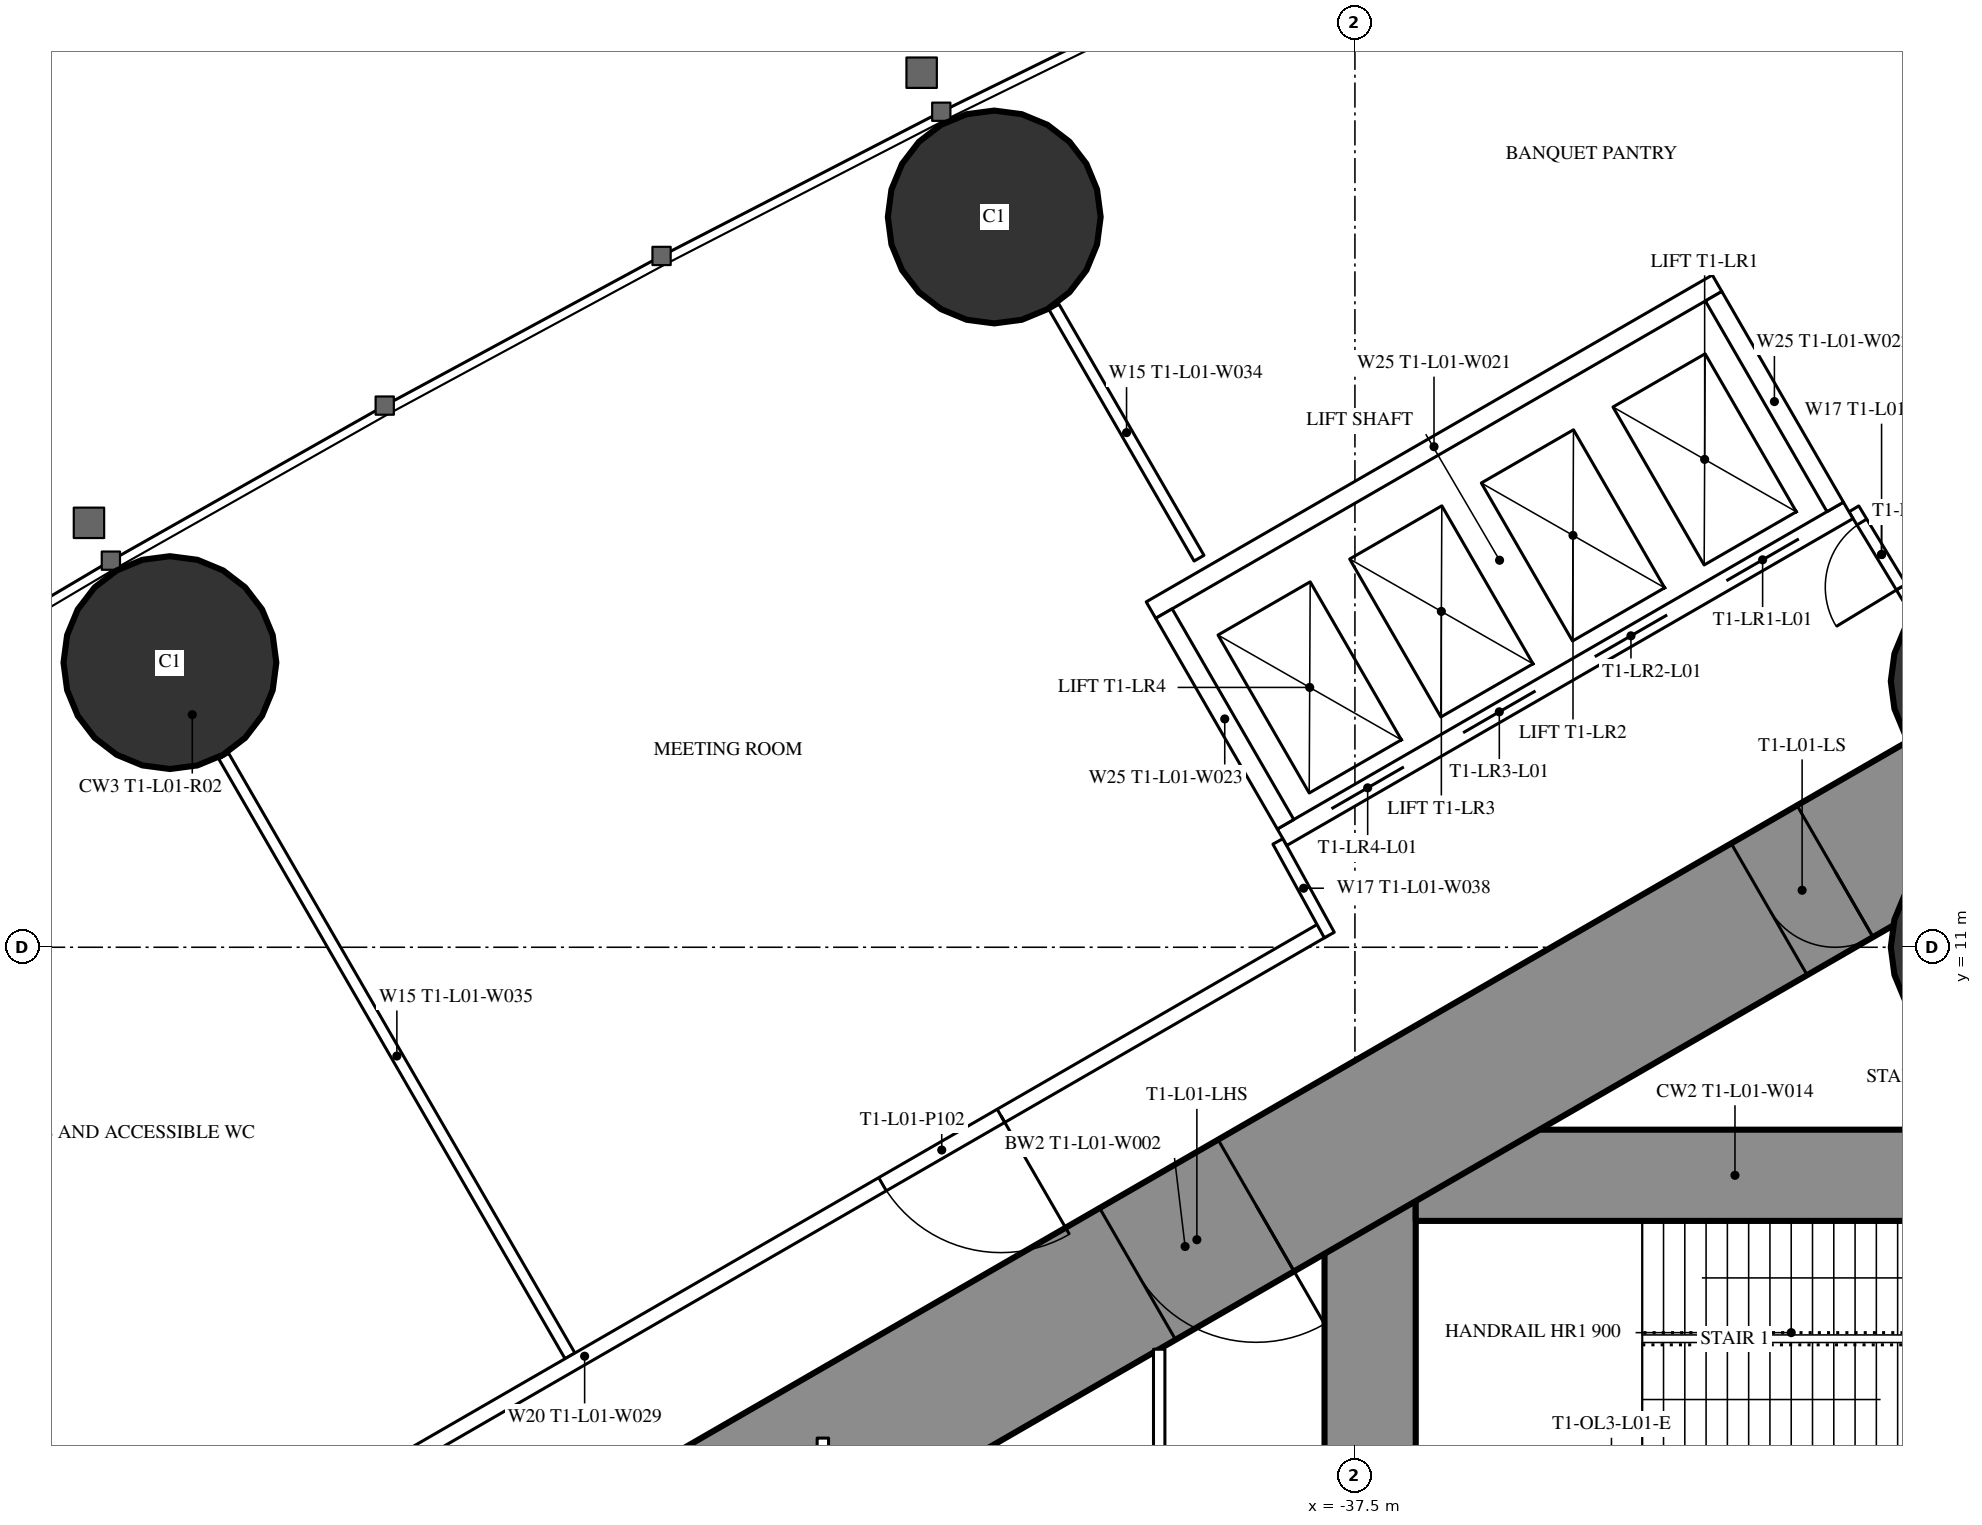
"""IFC4 building model, lengths in metres.
Left out: names, types, materials, properties, quantities, classifications, styles, units other than length and angle.
Written with IfcOpenShell. Run it as: python <this file> out.ifc"""

import sys

from ifc_helpers import new_model, si_unit, direction, frame, frame_2d, origin, origin_2d, place, context, subcontext, project, spatial, rectangle, hollow_circle, extrude, element, fill, save


model = new_model("IFC4")
c1 = context("Model", 3, precision=1e-05, world=origin(), true_north=direction((0.0, 1.0)))
c2 = subcontext(c1, "Body", "Model", "MODEL_VIEW")
j1 = project(units=[si_unit("LENGTHUNIT", "METRE"), si_unit("PLANEANGLEUNIT", "RADIAN")], contexts=[c1])
p1 = place(None, origin())
s1 = spatial("IfcSite", under=j1, at=p1, CompositionType="ELEMENT")
p2 = place(p1, origin())
s2 = spatial("IfcBuilding", under=s1, at=p2, CompositionType="ELEMENT")
p3 = place(p2, frame((0.0, 0.0, 7.2)))
s3 = spatial("IfcBuildingStorey", under=s2, at=p3, CompositionType="ELEMENT", Elevation=7.2)
for number, where, z_axis, x_axis in (
    (1, (-29.05, 11.0, 0.0), (0.0, 0.0, 1.0), (1.0, 0.0, 0.0)),
    (2, (-29.05, 14.5, 0.0), (0.0, 0.0, 1.0), (1.0, 0.0, 0.0)),
    (3, (-42.245, 20.607, 0.0), (0.0, 0.0, 1.0), (1.0, 0.0, 0.0)),
    (4, (-53.09, 14.745, 0.0), (0.0, 0.0, 1.0), (1.0, 0.0, 0.0)),
):
    element("IfcColumn", number, at=place(p3, frame(where, z_axis=z_axis, x_axis=x_axis)), inside=s3, PredefinedType="COLUMN", context=c2, shape_type="SweptSolid", body=[
        extrude(hollow_circle(Radius=1.4, WallThickness=0.12, at=origin_2d()), origin(), (0.0, 0.0, 1.0), 5.4),
    ])
p4 = place(p3, frame((-37.3, 8.6, 0.0), z_axis=(0.0, 0.0, 1.0), x_axis=(0.0, -1.0, 0.0)))
e5 = element("IfcWall", 5, at=p4, inside=s3, PredefinedType="SHEAR", context=c2, shape_type="SweptSolid", body=[
    extrude(rectangle(XDim=17.2, YDim=1.2, at=frame_2d((8.6, 0.0))), origin(), (0.0, 0.0, 1.0), 5.4),
])
p5 = place(p4, frame((7.7, 0.0, 0.0)))
e6 = element("IfcOpeningElement", 6, at=p5, cuts=e5, PredefinedType="OPENING", context=c2, shape_type="SweptSolid", body=[
    extrude(rectangle(XDim=1.8, YDim=2.2, at=frame_2d((0.9, 1.1))), frame((0.0, 0.61, 0.0), z_axis=(0.0, -1.0, 0.0), x_axis=(1.0, 0.0, 0.0)), (0.0, 0.0, 1.0), 1.22),
])
p6 = place(p3, frame((-28.3, 8.0, 0.0), z_axis=(0.0, 0.0, 1.0), x_axis=(-1.0, 0.0, 0.0)))
e7 = element("IfcWall", 7, at=p6, inside=s3, PredefinedType="SHEAR", context=c2, shape_type="SweptSolid", body=[
    extrude(rectangle(XDim=8.4, YDim=1.2, at=frame_2d((4.2, 0.0))), origin(), (0.0, 0.0, 1.0), 5.4),
])
p7 = place(p6, frame((0.25, 0.0, 0.0)))
e8 = element("IfcOpeningElement", 8, at=p7, cuts=e7, PredefinedType="OPENING", context=c2, shape_type="SweptSolid", body=[
    extrude(rectangle(XDim=1.0, YDim=2.2, at=frame_2d((0.5, 1.1))), frame((0.0, 0.61, 0.0), z_axis=(0.0, -1.0, 0.0), x_axis=(1.0, 0.0, 0.0)), (0.0, 0.0, 1.0), 1.22),
])
p8 = place(p3, frame((-27.2, 14.3, 0.0), z_axis=(0.0, 0.0, 1.0), x_axis=(-0.866026593062, -0.499997940104, 0.0)))
e9 = element("IfcWall", 9, at=p8, inside=s3, PredefinedType="SHEAR", context=c2, shape_type="SweptSolid", body=[
    extrude(rectangle(XDim=28.946, YDim=2.0, at=frame_2d((14.473, 0.0))), origin(), (0.0, 0.0, 1.0), 5.4),
])
p9 = place(p8, frame((4.6, 0.0, 0.0)))
e10 = element("IfcOpeningElement", 10, at=p9, cuts=e9, PredefinedType="OPENING", context=c2, shape_type="SweptSolid", body=[
    extrude(rectangle(XDim=1.0, YDim=2.2, at=frame_2d((0.5, 1.1))), frame((0.0, 1.01, 0.0), z_axis=(0.0, -1.0, 0.0), x_axis=(1.0, 0.0, 0.0)), (0.0, 0.0, 1.0), 2.02),
])
p10 = place(p8, frame((13.395, 0.0, 0.0)))
e11 = element("IfcOpeningElement", 11, at=p10, cuts=e9, PredefinedType="OPENING", context=c2, shape_type="SweptSolid", body=[
    extrude(rectangle(XDim=1.8, YDim=2.2, at=frame_2d((0.9, 1.1))), frame((0.0, 1.01, 0.0), z_axis=(0.0, -1.0, 0.0), x_axis=(1.0, 0.0, 0.0)), (0.0, 0.0, 1.0), 2.02),
])
p11 = place(p3, frame((-47.827, 5.624, 0.0), z_axis=(0.0, 0.0, 1.0), x_axis=(-0.499995404498, 0.866028056982, 0.0)))
e12 = element("IfcWall", 12, at=p11, inside=s3, PredefinedType="PARTITIONING", context=c2, shape_type="SweptSolid", body=[
    extrude(rectangle(XDim=9.11, YDim=0.15, at=frame_2d((4.555, 0.0))), origin(), (0.0, 0.0, 1.0), 4.05),
])
p12 = place(p3, frame((-39.551, 16.119, 0.0), z_axis=(0.0, 0.0, 1.0), x_axis=(-0.500014214979, 0.866017196607, 0.0)))
e13 = element("IfcWall", 13, at=p12, inside=s3, PredefinedType="PARTITIONING", context=c2, shape_type="SweptSolid", body=[
    extrude(rectangle(XDim=3.815, YDim=0.15, at=frame_2d((1.907, 0.0))), origin(), (0.0, 0.0, 1.0), 5.05),
])
p13 = place(p3, frame((-27.5, 17.244, 0.0), z_axis=(0.0, 0.0, 1.0), x_axis=(-0.866039316896, -0.499975901009, 0.0)))
e14 = element("IfcWall", 14, at=p13, inside=s3, PredefinedType="PARTITIONING", context=c2, shape_type="SweptSolid", body=[
    extrude(rectangle(XDim=3.169, YDim=0.2, at=frame_2d((1.584, 0.0))), origin(), (0.0, 0.0, 1.0), 5.05),
])
p14 = place(p3, frame((-37.9, 11.24, 0.0), z_axis=(0.0, 0.0, 1.0), x_axis=(-0.866022995118, -0.50000417191, 0.0)))
e15 = element("IfcWall", 15, at=p14, inside=s3, PredefinedType="PARTITIONING", context=c2, shape_type="SweptSolid", body=[
    extrude(rectangle(XDim=22.48, YDim=0.2, at=frame_2d((11.24, 0.0))), origin(), (0.0, 0.0, 1.0), 5.05),
])
p15 = place(p14, frame((14.644, 0.0, 0.0)))
e16 = element("IfcOpeningElement", 16, at=p15, cuts=e15, PredefinedType="OPENING", context=c2, shape_type="SweptSolid", body=[
    extrude(rectangle(XDim=1.8, YDim=2.2, at=frame_2d((0.9, 1.1))), frame((0.0, 0.11, 0.0), z_axis=(0.0, -1.0, 0.0), x_axis=(1.0, 0.0, 0.0)), (0.0, 0.0, 1.0), 0.22),
])
p16 = place(p14, frame((20.069, 0.0, 0.0)))
e17 = element("IfcOpeningElement", 17, at=p16, cuts=e15, PredefinedType="OPENING", context=c2, shape_type="SweptSolid", body=[
    extrude(rectangle(XDim=1.8, YDim=2.2, at=frame_2d((0.9, 1.1))), frame((0.0, 0.11, 0.0), z_axis=(0.0, -1.0, 0.0), x_axis=(1.0, 0.0, 0.0)), (0.0, 0.0, 1.0), 0.22),
])
p17 = place(p14, frame((4.915, 0.0, 0.0)))
e18 = element("IfcOpeningElement", 18, at=p17, cuts=e15, PredefinedType="OPENING", context=c2, shape_type="SweptSolid", body=[
    extrude(rectangle(XDim=1.8, YDim=2.2, at=frame_2d((0.9, 1.1))), frame((0.0, 0.11, 0.0), z_axis=(0.0, -1.0, 0.0), x_axis=(1.0, 0.0, 0.0)), (0.0, 0.0, 1.0), 0.22),
])
p18 = place(p3, frame((-30.207, 15.566, 0.0), z_axis=(0.0, 0.0, 1.0), x_axis=(-0.518374889333, 0.855153479855, 0.0)))
e19 = element("IfcWall", 19, at=p18, inside=s3, PredefinedType="PARTITIONING", context=c2, shape_type="SweptSolid", body=[
    extrude(rectangle(XDim=1.405, YDim=0.15, at=frame_2d((0.703, 0.0))), origin(), (0.0, 0.0, 1.0), 5.05),
])
p19 = place(p18, frame((0.202, 0.0, 0.0)))
e20 = element("IfcOpeningElement", 20, at=p19, cuts=e19, PredefinedType="OPENING", context=c2, shape_type="SweptSolid", body=[
    extrude(rectangle(XDim=1.0, YDim=2.2, at=frame_2d((0.5, 1.1))), frame((0.0, 0.085, 0.0), z_axis=(0.0, -1.0, 0.0), x_axis=(1.0, 0.0, 0.0)), (0.0, 0.0, 1.0), 0.17),
])
p20 = place(p3, frame((-38.513, 12.392, 0.0), z_axis=(0.0, 0.0, 1.0), x_axis=(0.481358300093, -0.876523922624, 0.0)))
e21 = element("IfcWall", 21, at=p20, inside=s3, PredefinedType="PARTITIONING", context=c2, shape_type="SweptSolid", body=[
    extrude(rectangle(XDim=1.405, YDim=0.15, at=frame_2d((0.703, 0.0))), origin(), (0.0, 0.0, 1.0), 5.05),
])
p21 = place(p3, frame((-40.075, 5.712, 0.0), z_axis=(0.0, 0.0, 1.0), x_axis=(0.0, -1.0, 0.0)))
e22 = element("IfcWall", 22, at=p21, inside=s3, PredefinedType="PARTITIONING", context=c2, shape_type="SweptSolid", body=[
    extrude(rectangle(XDim=11.424, YDim=0.15, at=frame_2d((5.712, 0.0))), origin(), (0.0, 0.0, 1.0), 5.05),
])
p22 = place(p21, frame((4.812, 0.0, 0.0)))
e23 = element("IfcOpeningElement", 23, at=p22, cuts=e22, PredefinedType="OPENING", context=c2, shape_type="SweptSolid", body=[
    extrude(rectangle(XDim=1.8, YDim=2.2, at=frame_2d((0.9, 1.1))), frame((0.0, 0.085, 0.0), z_axis=(0.0, -1.0, 0.0), x_axis=(1.0, 0.0, 0.0)), (0.0, 0.0, 1.0), 0.17),
])
p23 = place(p3, frame((-44.5, 4.543, 0.0), z_axis=(0.0, 0.0, 1.0), x_axis=(0.0, -1.0, 0.0)))
e24 = element("IfcWall", 24, at=p23, inside=s3, PredefinedType="PARTITIONING", context=c2, shape_type="SweptSolid", body=[
    extrude(rectangle(XDim=9.085, YDim=0.15, at=frame_2d((4.543, 0.0))), origin(), (0.0, 0.0, 1.0), 5.05),
])
p24 = place(p23, frame((4.043, 0.0, 0.0)))
e25 = element("IfcOpeningElement", 25, at=p24, cuts=e24, PredefinedType="OPENING", context=c2, shape_type="SweptSolid", body=[
    extrude(rectangle(XDim=1.0, YDim=2.2, at=frame_2d((0.5, 1.1))), frame((0.0, 0.085, 0.0), z_axis=(0.0, -1.0, 0.0), x_axis=(1.0, 0.0, 0.0)), (0.0, 0.0, 1.0), 0.17),
])
p25 = place(p3, frame((-31.01, 16.747, 0.0), z_axis=(0.0, 0.0, 1.0), x_axis=(-0.866028165386, -0.499995216735, 0.0)))
e26 = element("IfcWall", 26, at=p25, inside=s3, PredefinedType="PARTITIONING", context=c2, shape_type="SweptSolid", body=[
    extrude(rectangle(XDim=8.6, YDim=0.25, at=frame_2d((4.3, 0.0))), origin(), (0.0, 0.0, 1.0), 5.05),
])
p26 = place(p25, frame((0.75, 0.0, 0.0)))
e27 = element("IfcOpeningElement", 27, at=p26, cuts=e26, PredefinedType="OPENING", context=c2, shape_type="SweptSolid", body=[
    extrude(rectangle(XDim=1.1, YDim=2.2, at=frame_2d((0.55, 1.1))), frame((0.0, 0.135, 0.0), z_axis=(0.0, -1.0, 0.0), x_axis=(1.0, 0.0, 0.0)), (0.0, 0.0, 1.0), 0.27),
])
p27 = place(p25, frame((2.75, 0.0, 0.0)))
e28 = element("IfcOpeningElement", 28, at=p27, cuts=e26, PredefinedType="OPENING", context=c2, shape_type="SweptSolid", body=[
    extrude(rectangle(XDim=1.1, YDim=2.2, at=frame_2d((0.55, 1.1))), frame((0.0, 0.135, 0.0), z_axis=(0.0, -1.0, 0.0), x_axis=(1.0, 0.0, 0.0)), (0.0, 0.0, 1.0), 0.27),
])
p28 = place(p25, frame((4.75, 0.0, 0.0)))
e29 = element("IfcOpeningElement", 29, at=p28, cuts=e26, PredefinedType="OPENING", context=c2, shape_type="SweptSolid", body=[
    extrude(rectangle(XDim=1.1, YDim=2.2, at=frame_2d((0.55, 1.1))), frame((0.0, 0.135, 0.0), z_axis=(0.0, -1.0, 0.0), x_axis=(1.0, 0.0, 0.0)), (0.0, 0.0, 1.0), 0.27),
])
p29 = place(p25, frame((6.75, 0.0, 0.0)))
e30 = element("IfcOpeningElement", 30, at=p29, cuts=e26, PredefinedType="OPENING", context=c2, shape_type="SweptSolid", body=[
    extrude(rectangle(XDim=1.1, YDim=2.2, at=frame_2d((0.55, 1.1))), frame((0.0, 0.135, 0.0), z_axis=(0.0, -1.0, 0.0), x_axis=(1.0, 0.0, 0.0)), (0.0, 0.0, 1.0), 0.27),
])
p30 = place(p3, frame((-32.736, 19.736, 0.0), z_axis=(0.0, 0.0, 1.0), x_axis=(-0.866028165386, -0.499995216735, 0.0)))
e31 = element("IfcWall", 31, at=p30, inside=s3, PredefinedType="PARTITIONING", context=c2, shape_type="SweptSolid", body=[
    extrude(rectangle(XDim=8.6, YDim=0.25, at=frame_2d((4.3, 0.0))), origin(), (0.0, 0.0, 1.0), 5.05),
])
p31 = place(p3, frame((-31.181, 16.793, 0.0), z_axis=(0.0, 0.0, 1.0), x_axis=(-0.499929347863, 0.866066190972, 0.0)))
e32 = element("IfcWall", 32, at=p31, inside=s3, PredefinedType="PARTITIONING", context=c2, shape_type="SweptSolid", body=[
    extrude(rectangle(XDim=3.201, YDim=0.25, at=frame_2d((1.6, 0.0))), origin(), (0.0, 0.0, 1.0), 5.05),
])
p32 = place(p3, frame((-38.413, 12.618, 0.0), z_axis=(0.0, 0.0, 1.0), x_axis=(-0.499872130319, 0.866099216793, 0.0)))
e33 = element("IfcWall", 33, at=p32, inside=s3, PredefinedType="PARTITIONING", context=c2, shape_type="SweptSolid", body=[
    extrude(rectangle(XDim=3.2, YDim=0.25, at=frame_2d((1.6, 0.0))), origin(), (0.0, 0.0, 1.0), 5.05),
])
p33 = place(p19, origin())
e34 = element("IfcDoor", 34, at=p33, inside=s3, OperationType="SINGLE_SWING_LEFT", PredefinedType="DOOR", context=c2, shape_type="SweptSolid", body=[
    extrude(rectangle(XDim=1.0, YDim=2.2, at=frame_2d((0.5, 1.1))), frame((0.0, 0.025, 0.0), z_axis=(0.0, -1.0, 0.0), x_axis=(1.0, 0.0, 0.0)), (0.0, 0.0, 1.0), 0.05),
])
fill(e20, e34)
p34 = place(p17, origin())
e35 = element("IfcDoor", 35, at=p34, inside=s3, OperationType="DOUBLE_DOOR_SINGLE_SWING", PredefinedType="DOOR", context=c2, shape_type="SweptSolid", body=[
    extrude(rectangle(XDim=1.8, YDim=2.2, at=frame_2d((0.9, 1.1))), frame((0.0, 0.025, 0.0), z_axis=(0.0, -1.0, 0.0), x_axis=(1.0, 0.0, 0.0)), (0.0, 0.0, 1.0), 0.05),
])
fill(e18, e35)
p35 = place(p9, origin())
e36 = element("IfcDoor", 36, at=p35, inside=s3, OperationType="SINGLE_SWING_LEFT", PredefinedType="DOOR", context=c2, shape_type="SweptSolid", body=[
    extrude(rectangle(XDim=1.0, YDim=2.2, at=frame_2d((0.5, 1.1))), frame((0.0, 0.025, 0.0), z_axis=(0.0, -1.0, 0.0), x_axis=(1.0, 0.0, 0.0)), (0.0, 0.0, 1.0), 0.05),
])
fill(e10, e36)
p36 = place(p10, origin())
e37 = element("IfcDoor", 37, at=p36, inside=s3, OperationType="DOUBLE_DOOR_SINGLE_SWING", PredefinedType="DOOR", context=c2, shape_type="SweptSolid", body=[
    extrude(rectangle(XDim=1.8, YDim=2.2, at=frame_2d((0.9, 1.1))), frame((0.0, 0.025, 0.0), z_axis=(0.0, -1.0, 0.0), x_axis=(1.0, 0.0, 0.0)), (0.0, 0.0, 1.0), 0.05),
])
fill(e11, e37)
p37 = place(p26, origin())
e38 = element("IfcDoor", 38, at=p37, inside=s3, OperationType="DOUBLE_DOOR_SLIDING", PredefinedType="USERDEFINED", context=c2, shape_type="SweptSolid", body=[
    extrude(rectangle(XDim=1.1, YDim=2.2, at=frame_2d((0.55, 1.1))), frame((0.0, 0.025, 0.0), z_axis=(0.0, -1.0, 0.0), x_axis=(1.0, 0.0, 0.0)), (0.0, 0.0, 1.0), 0.05),
])
fill(e27, e38)
p38 = place(p27, origin())
e39 = element("IfcDoor", 39, at=p38, inside=s3, OperationType="DOUBLE_DOOR_SLIDING", PredefinedType="USERDEFINED", context=c2, shape_type="SweptSolid", body=[
    extrude(rectangle(XDim=1.1, YDim=2.2, at=frame_2d((0.55, 1.1))), frame((0.0, 0.025, 0.0), z_axis=(0.0, -1.0, 0.0), x_axis=(1.0, 0.0, 0.0)), (0.0, 0.0, 1.0), 0.05),
])
fill(e28, e39)
p39 = place(p28, origin())
e40 = element("IfcDoor", 40, at=p39, inside=s3, OperationType="DOUBLE_DOOR_SLIDING", PredefinedType="USERDEFINED", context=c2, shape_type="SweptSolid", body=[
    extrude(rectangle(XDim=1.1, YDim=2.2, at=frame_2d((0.55, 1.1))), frame((0.0, 0.025, 0.0), z_axis=(0.0, -1.0, 0.0), x_axis=(1.0, 0.0, 0.0)), (0.0, 0.0, 1.0), 0.05),
])
fill(e29, e40)
p40 = place(p29, origin())
e41 = element("IfcDoor", 41, at=p40, inside=s3, OperationType="DOUBLE_DOOR_SLIDING", PredefinedType="USERDEFINED", context=c2, shape_type="SweptSolid", body=[
    extrude(rectangle(XDim=1.1, YDim=2.2, at=frame_2d((0.55, 1.1))), frame((0.0, 0.025, 0.0), z_axis=(0.0, -1.0, 0.0), x_axis=(1.0, 0.0, 0.0)), (0.0, 0.0, 1.0), 0.05),
])
fill(e30, e41)
save(model, sys.argv[1])
